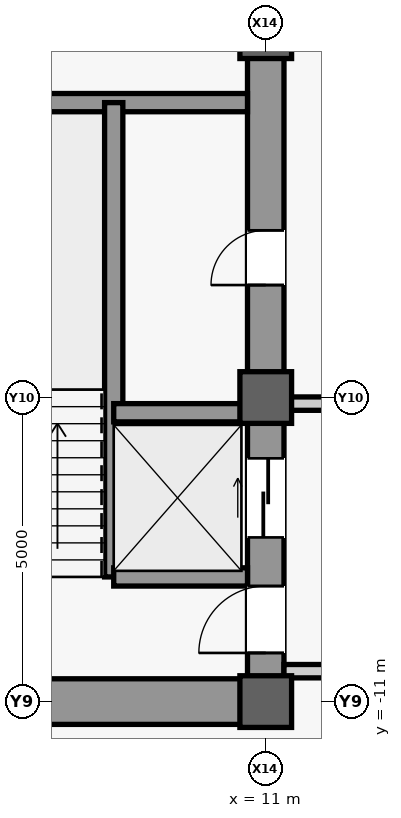
"""IFC4 building model, lengths in metres.
Left out: names, types, materials, properties, quantities, classifications, styles, units other than length and angle.
Written with IfcOpenShell. Run it as: python <this file> out.ifc"""

import sys

from ifc_helpers import new_model, si_unit, direction, frame, frame_2d, origin, origin_2d, place, context, subcontext, project, spatial, rectangle, extrude, source, transform, mapped, element, fill, save


model = new_model("IFC4")
c1 = context("Model", 3, precision=1e-05, world=origin(), true_north=direction((0.0, 1.0)))
c2 = subcontext(c1, "Body", "Model", "MODEL_VIEW")
j1 = project(units=[si_unit("LENGTHUNIT", "METRE"), si_unit("PLANEANGLEUNIT", "RADIAN")], contexts=[c1])
p1 = place(None, origin())
s1 = spatial("IfcSite", under=j1, at=p1, CompositionType="ELEMENT")
p2 = place(p1, origin())
s2 = spatial("IfcBuilding", under=s1, at=p2, CompositionType="ELEMENT")
p3 = place(p2, frame((0.0, 0.0, 183.1)))
s3 = spatial("IfcBuildingStorey", under=s2, at=p3, CompositionType="ELEMENT", Elevation=183.1)
m1 = source(origin(), c2, "Body", "SweptSolid", [
    extrude(rectangle(XDim=22.0, YDim=0.6, at=frame_2d((11.0, 0.0))), origin(), (0.0, 0.0, 1.0), 3.78),
])
p4 = place(p3, frame((11.0, -11.0, 0.0), z_axis=(0.0, 0.0, 1.0), x_axis=(0.0, 1.0, 0.0)))
e1 = element("IfcWall", 1, at=p4, inside=s3, PredefinedType="SHEAR", context=c2, shape_type="MappedRepresentation", body=[
    mapped(m1, transform((0.0, 0.0, 0.0), scale=1.0)),
])
m2 = source(origin(), c2, "Body", "SweptSolid", [
    extrude(rectangle(XDim=1.1, YDim=2.2, at=frame_2d((0.55, 1.1))), frame((0.0, 0.31, 0.0), z_axis=(0.0, -1.0, 0.0), x_axis=(1.0, 0.0, 0.0)), (0.0, 0.0, 1.0), 0.62),
])
p5 = place(p4, frame((0.8, 0.0, 0.0)))
e2 = element("IfcOpeningElement", 2, at=p5, cuts=e1, PredefinedType="OPENING", context=c2, shape_type="MappedRepresentation", body=[
    mapped(m2, transform((0.0, 0.0, 0.0), scale=1.0)),
])
m3 = source(origin(), c2, "Body", "SweptSolid", [
    extrude(rectangle(XDim=0.9, YDim=2.15, at=frame_2d((0.45, 1.075))), frame((0.0, 0.31, 0.0), z_axis=(0.0, -1.0, 0.0), x_axis=(1.0, 0.0, 0.0)), (0.0, 0.0, 1.0), 0.62),
])
p6 = place(p4, frame((6.85, 0.0, 0.0)))
e3 = element("IfcOpeningElement", 3, at=p6, cuts=e1, PredefinedType="OPENING", context=c2, shape_type="MappedRepresentation", body=[
    mapped(m3, transform((0.0, 0.0, 0.0), scale=1.0)),
])
m4 = source(origin(), c2, "Body", "SweptSolid", [
    extrude(rectangle(XDim=1.3, YDim=2.3, at=frame_2d((0.65, 1.15))), frame((0.0, 0.31, 0.0), z_axis=(0.0, -1.0, 0.0), x_axis=(1.0, 0.0, 0.0)), (0.0, 0.0, 1.0), 0.62),
])
p7 = place(p4, frame((2.7, 0.0, 0.0)))
e4 = element("IfcOpeningElement", 4, at=p7, cuts=e1, PredefinedType="OPENING", context=c2, shape_type="MappedRepresentation", body=[
    mapped(m4, transform((0.0, 0.0, 0.0), scale=1.0)),
])
p8 = place(p4, frame((13.35, 0.0, 0.0)))
e5 = element("IfcOpeningElement", 5, at=p8, cuts=e1, PredefinedType="OPENING", context=c2, shape_type="MappedRepresentation", body=[
    mapped(m4, transform((0.0, 0.0, 0.0), scale=1.0)),
])
m5 = source(origin(), c2, "Body", "SweptSolid", [
    extrude(rectangle(XDim=5.85, YDim=0.75, at=frame_2d((2.925, 0.0))), origin(), (0.0, 0.0, 1.0), 3.78),
])
p9 = place(p3, frame((4.85, -11.0, 0.0), z_axis=(0.0, 0.0, 1.0), x_axis=(1.0, 0.0, 0.0)))
e6 = element("IfcWall", 6, at=p9, inside=s3, PredefinedType="SHEAR", context=c2, shape_type="MappedRepresentation", body=[
    mapped(m5, transform((0.0, 0.0, 0.0), scale=1.0)),
])
m6 = source(origin(), c2, "Body", "SweptSolid", [
    extrude(rectangle(XDim=5.6, YDim=0.3, at=frame_2d((2.8, 0.0))), origin(), (0.0, 0.0, 1.0), 3.78),
])
p10 = place(p3, frame((5.1, -1.15, 0.0), z_axis=(0.0, 0.0, 1.0), x_axis=(1.0, 0.0, 0.0)))
e7 = element("IfcWall", 7, at=p10, inside=s3, PredefinedType="SHEAR", context=c2, shape_type="MappedRepresentation", body=[
    mapped(m6, transform((0.0, 0.0, 0.0), scale=1.0)),
])
m7 = source(origin(), c2, "Body", "SweptSolid", [
    extrude(rectangle(XDim=0.85, YDim=0.85, at=origin_2d()), origin(), (0.0, 0.0, 1.0), 4.0),
])
for number, where, z_axis, x_axis in (
    (8, (11.0, -11.0, 0.0), (0.0, 0.0, 1.0), (1.0, 0.0, 0.0)),
    (9, (11.0, -6.0, 0.0), (0.0, 0.0, 1.0), (1.0, 0.0, 0.0)),
    (10, (11.0, 0.0, 0.0), (0.0, 0.0, 1.0), (1.0, 0.0, 0.0)),
):
    element("IfcColumn", number, at=place(p3, frame(where, z_axis=z_axis, x_axis=x_axis)), inside=s3, PredefinedType="COLUMN", context=c2, shape_type="MappedRepresentation", body=[
        mapped(m7, transform((0.0, 0.0, 0.0), scale=1.0)),
    ])
m8 = source(origin(), c2, "Body", "SweptSolid", [
    extrude(rectangle(XDim=7.8, YDim=0.3, at=frame_2d((3.9, 0.0))), origin(), (0.0, 0.0, 1.0), 3.78),
])
p11 = place(p3, frame((8.5, -8.95, 0.0), z_axis=(0.0, 0.0, 1.0), x_axis=(0.0, 1.0, 0.0)))
e11 = element("IfcWall", 11, at=p11, inside=s3, PredefinedType="SHEAR", context=c2, shape_type="MappedRepresentation", body=[
    mapped(m8, transform((0.0, 0.0, 0.0), scale=1.0)),
])
m9 = source(origin(), c2, "Body", "SweptSolid", [
    extrude(rectangle(XDim=2.2, YDim=0.3, at=frame_2d((1.1, 0.0))), origin(), (0.0, 0.0, 1.0), 3.78),
])
for number, where, z_axis, x_axis in (
    (12, (8.5, -8.95, 0.0), (0.0, 0.0, 1.0), (1.0, 0.0, 0.0)),
    (13, (8.5, -6.25, 0.0), (0.0, 0.0, 1.0), (1.0, 0.0, 0.0)),
):
    element("IfcWall", number, at=place(p3, frame(where, z_axis=z_axis, x_axis=x_axis)), inside=s3, PredefinedType="SHEAR", context=c2, shape_type="MappedRepresentation", body=[
        mapped(m9, transform((0.0, 0.0, 0.0), scale=1.0)),
    ])
m10 = source(origin(), c2, "Body", "SweptSolid", [
    extrude(rectangle(XDim=4.05, YDim=0.22, at=frame_2d((2.025, 0.0))), origin(), (0.0, 0.0, 1.0), 3.78),
])
p12 = place(p3, frame((11.3, -10.5, 0.0), z_axis=(0.0, 0.0, 1.0), x_axis=(1.0, 0.0, 0.0)))
e14 = element("IfcWall", 14, at=p12, inside=s3, PredefinedType="PARTITIONING", context=c2, shape_type="MappedRepresentation", body=[
    mapped(m10, transform((0.0, 0.0, 0.0), scale=1.0)),
])
m11 = source(origin(), c2, "Body", "SweptSolid", [
    extrude(rectangle(XDim=4.05, YDim=0.22, at=frame_2d((2.025, 0.0))), origin(), (0.0, 0.0, 1.0), 3.007),
])
p13 = place(p3, frame((11.3, -6.1, 0.0), z_axis=(0.0, 0.0, 1.0), x_axis=(1.0, 0.0, 0.0)))
e15 = element("IfcWall", 15, at=p13, inside=s3, PredefinedType="PARTITIONING", context=c2, shape_type="MappedRepresentation", body=[
    mapped(m11, transform((0.0, 0.0, 0.0), scale=1.0)),
])
m12 = source(origin(), c2, "Body", "SweptSolid", [
    extrude(rectangle(XDim=1.1, YDim=2.2, at=frame_2d((0.55, 1.1))), frame((0.0, 0.025, 0.0), z_axis=(0.0, -1.0, 0.0), x_axis=(1.0, 0.0, 0.0)), (0.0, 0.0, 1.0), 0.05),
])
p14 = place(p5, origin())
e16 = element("IfcDoor", 16, at=p14, inside=s3, OperationType="SINGLE_SWING_LEFT", PredefinedType="DOOR", context=c2, shape_type="MappedRepresentation", body=[
    mapped(m12, transform((0.0, 0.0, 0.0), scale=1.0)),
])
fill(e2, e16)
m13 = source(origin(), c2, "Body", "SweptSolid", [
    extrude(rectangle(XDim=0.9, YDim=2.15, at=frame_2d((0.45, 1.075))), frame((0.0, 0.025, 0.0), z_axis=(0.0, -1.0, 0.0), x_axis=(1.0, 0.0, 0.0)), (0.0, 0.0, 1.0), 0.05),
])
p15 = place(p6, origin())
e17 = element("IfcDoor", 17, at=p15, inside=s3, OperationType="SINGLE_SWING_LEFT", PredefinedType="DOOR", context=c2, shape_type="MappedRepresentation", body=[
    mapped(m13, transform((0.0, 0.0, 0.0), scale=1.0)),
])
fill(e3, e17)
m14 = source(origin(), c2, "Body", "SweptSolid", [
    extrude(rectangle(XDim=1.3, YDim=2.3, at=frame_2d((0.65, 1.15))), frame((0.0, 0.025, 0.0), z_axis=(0.0, -1.0, 0.0), x_axis=(1.0, 0.0, 0.0)), (0.0, 0.0, 1.0), 0.05),
])
p16 = place(p7, origin())
e18 = element("IfcDoor", 18, at=p16, inside=s3, OperationType="SLIDING_TO_LEFT", PredefinedType="DOOR", context=c2, shape_type="MappedRepresentation", body=[
    mapped(m14, transform((0.0, 0.0, 0.0), scale=1.0)),
])
fill(e4, e18)
save(model, sys.argv[1])
